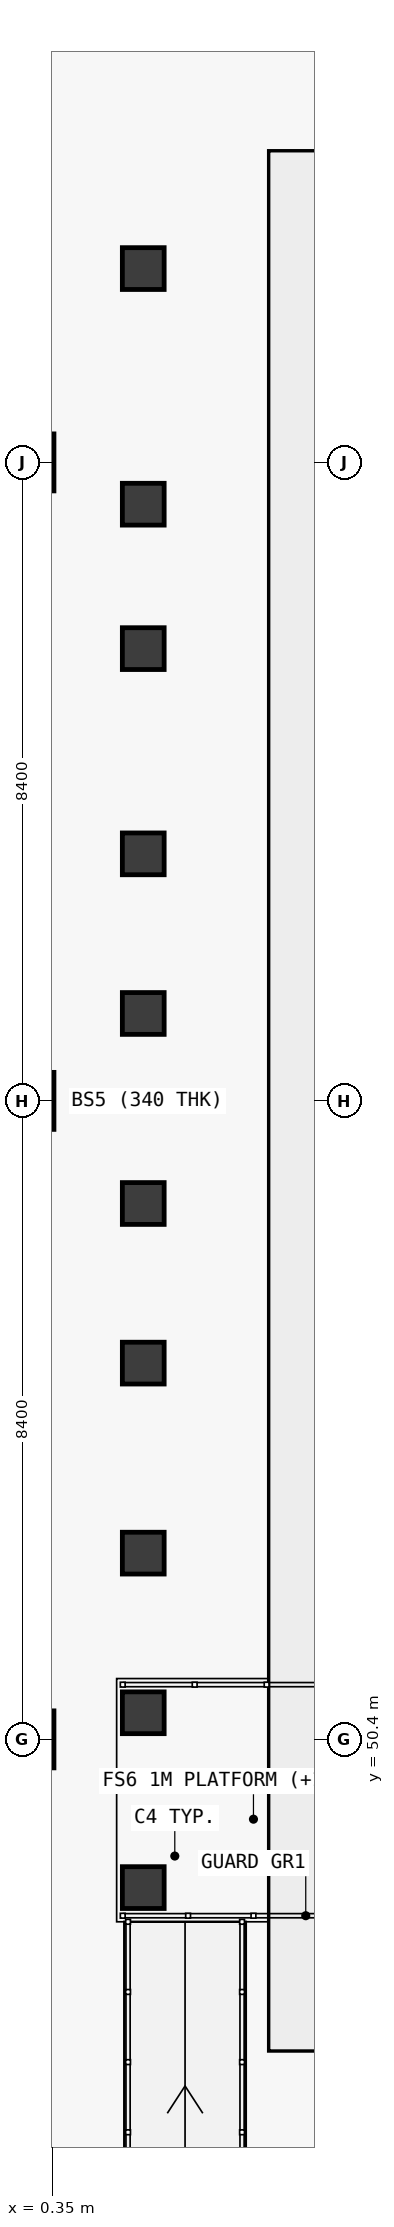
"""IFC4 building model, lengths in metres.
Left out: names, types, materials, properties, quantities, classifications, styles, units other than length and angle.
Written with IfcOpenShell. Run it as: python <this file> out.ifc"""

import sys

from ifc_helpers import new_model, si_unit, direction, frame, origin, origin_2d, place, context, subcontext, project, spatial, rectangle, extrude, element, save


model = new_model("IFC4")
c1 = context("Model", 3, precision=1e-05, world=origin(), true_north=direction((0.0, 1.0)))
c2 = subcontext(c1, "Body", "Model", "MODEL_VIEW")
j1 = project(units=[si_unit("LENGTHUNIT", "METRE"), si_unit("PLANEANGLEUNIT", "RADIAN")], contexts=[c1])
p1 = place(None, origin())
s1 = spatial("IfcSite", under=j1, at=p1, CompositionType="ELEMENT")
p2 = place(p1, origin())
s2 = spatial("IfcBuilding", under=s1, at=p2, CompositionType="ELEMENT")
p3 = place(p2, origin())
s3 = spatial("IfcBuildingStorey", under=s2, at=p3, CompositionType="ELEMENT", Elevation=0.0)
for number, where, z_axis, x_axis in (
    (1, (0.0, 50.4, 0.0), (0.0, 0.0, 1.0), (1.0, 0.0, 0.0)),
    (2, (0.0, 58.8, 0.0), (0.0, 0.0, 1.0), (1.0, 0.0, 0.0)),
    (3, (0.0, 67.2, 0.0), (0.0, 0.0, 1.0), (1.0, 0.0, 0.0)),
):
    element("IfcColumn", number, at=place(p3, frame(where, z_axis=z_axis, x_axis=x_axis)), inside=s3, PredefinedType="COLUMN", context=c2, shape_type="SweptSolid", body=[
        extrude(rectangle(XDim=0.75, YDim=0.75, at=origin_2d()), origin(), (0.0, 0.0, 1.0), 4.8),
    ])
for number, where, z_axis, x_axis in (
    (4, (1.55, 48.45, 0.0), (0.0, 0.0, 1.0), (1.0, 0.0, 0.0)),
    (5, (1.55, 50.75, 0.0), (0.0, 0.0, 1.0), (1.0, 0.0, 0.0)),
):
    element("IfcColumn", number, at=place(p3, frame(where, z_axis=z_axis, x_axis=x_axis)), inside=s3, PredefinedType="COLUMN", context=c2, shape_type="SweptSolid", body=[
        extrude(rectangle(XDim=0.55, YDim=0.55, at=origin_2d()), origin(), (0.0, 0.0, 1.0), 0.62),
    ])
for number, where, z_axis, x_axis in (
    (6, (1.55, 52.85, 0.0), (0.0, 0.0, 1.0), (1.0, 0.0, 0.0)),
    (7, (1.55, 55.35, 0.0), (0.0, 0.0, 1.0), (1.0, 0.0, 0.0)),
):
    element("IfcColumn", number, at=place(p3, frame(where, z_axis=z_axis, x_axis=x_axis)), inside=s3, PredefinedType="COLUMN", context=c2, shape_type="SweptSolid", body=[
        extrude(rectangle(XDim=0.55, YDim=0.55, at=origin_2d()), origin(), (0.0, 0.0, 1.0), 4.42),
    ])
for number, where, z_axis, x_axis in (
    (8, (1.55, 57.45, 0.0), (0.0, 0.0, 1.0), (1.0, 0.0, 0.0)),
    (9, (1.55, 59.95, 0.0), (0.0, 0.0, 1.0), (1.0, 0.0, 0.0)),
    (10, (1.55, 62.05, 0.0), (0.0, 0.0, 1.0), (1.0, 0.0, 0.0)),
    (11, (1.55, 64.75, 0.0), (0.0, 0.0, 1.0), (1.0, 0.0, 0.0)),
    (12, (1.55, 66.65, 0.0), (0.0, 0.0, 1.0), (1.0, 0.0, 0.0)),
    (13, (1.55, 69.75, 0.0), (0.0, 0.0, 1.0), (1.0, 0.0, 0.0)),
):
    element("IfcColumn", number, at=place(p3, frame(where, z_axis=z_axis, x_axis=x_axis)), inside=s3, PredefinedType="COLUMN", context=c2, shape_type="SweptSolid", body=[
        extrude(rectangle(XDim=0.55, YDim=0.55, at=origin_2d()), origin(), (0.0, 0.0, 1.0), 4.8),
    ])
save(model, sys.argv[1])
